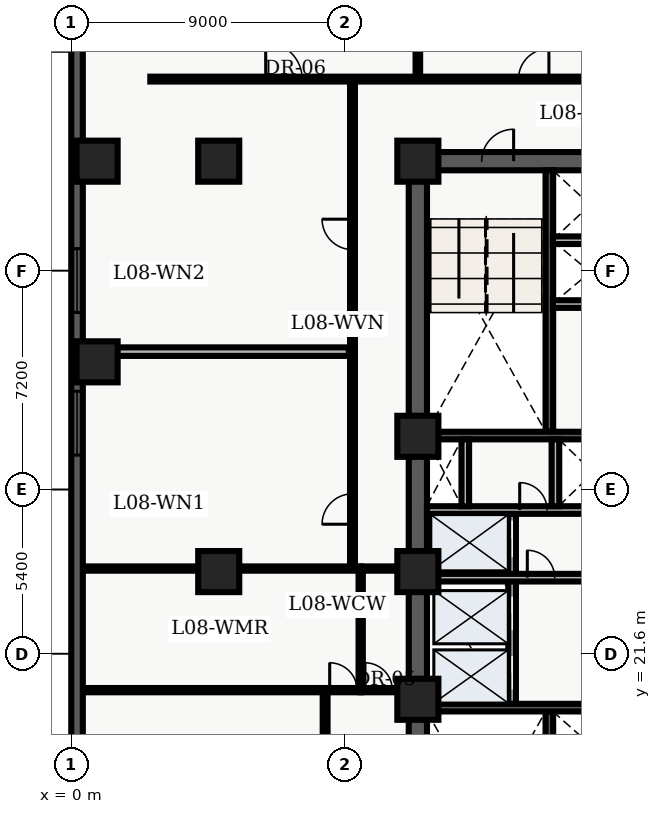
"""IFC4 building model, lengths in metres.
Left out: names, types, materials, properties, quantities, classifications, styles, units other than length and angle.
Written with IfcOpenShell. Run it as: python <this file> out.ifc"""

import sys

from ifc_helpers import new_model, entity, si_unit, converted_unit, direction, frame, origin_with_axes, origin_2d_with_axis, place, context, subcontext, project, spatial, polyline, rectangle, outline, extrude, element, fill, save


model = new_model("IFC4")
c1 = context("Model", 3, precision=1e-05, world=origin_with_axes(), true_north=direction((0.0, 1.0)))
c2 = subcontext(c1, "Body", "Model", "MODEL_VIEW")
j1 = project(units=[si_unit("LENGTHUNIT", "METRE"), converted_unit("PLANEANGLEUNIT", "DEGREE", entity("IfcPlaneAngleMeasure", 0.017), si_unit("PLANEANGLEUNIT", "RADIAN"), dimensions=[0, 0, 0, 0, 0, 0, 0])], contexts=[c1])
p1 = place(None, origin_with_axes())
s1 = spatial("IfcSite", under=j1, at=p1, CompositionType="ELEMENT")
p2 = place(p1, origin_with_axes())
s2 = spatial("IfcBuilding", under=s1, at=p2, CompositionType="ELEMENT")
p3 = place(p2, frame((0.0, 0.0, 36.6), z_axis=(0.0, 0.0, 1.0), x_axis=(1.0, 0.0, 0.0)))
s3 = spatial("IfcBuildingStorey", under=s2, at=p3, CompositionType="ELEMENT", Elevation=36.6)
p4 = place(p3, frame((11.4, 10.8, 0.0), z_axis=(0.0, 0.0, 1.0), x_axis=(0.0, 1.0, 0.0)))
e1 = element("IfcWall", 1, at=p4, inside=s3, PredefinedType="SHEAR", context=c2, shape_type="SweptSolid", body=[
    extrude(outline(polyline([(0.0, -0.3), (27.0, -0.3), (27.0, 0.3), (0.0, 0.3), (0.0, -0.3)])), origin_with_axes(), (0.0, 0.0, 1.0), 3.66),
])
p5 = place(p3, frame((11.4, 37.8, 0.0), z_axis=(0.0, 0.0, 1.0), x_axis=(1.0, 0.0, 0.0)))
e2 = element("IfcWall", 2, at=p5, inside=s3, PredefinedType="SHEAR", context=c2, shape_type="SweptSolid", body=[
    extrude(outline(polyline([(0.0, -0.3), (7.2, -0.3), (7.2, 0.3), (0.0, 0.3), (0.0, -0.3)])), origin_with_axes(), (0.0, 0.0, 1.0), 3.66),
])
p6 = place(p5, frame((2.625, 0.0, 0.0), z_axis=(0.0, 0.0, 1.0), x_axis=(1.0, 0.0, 0.0)))
e3 = element("IfcOpeningElement", 3, at=p6, cuts=e2, PredefinedType="OPENING", context=c2, shape_type="SweptSolid", body=[
    extrude(rectangle(XDim=1.05, YDim=0.62, at=origin_2d_with_axis()), origin_with_axes(), (0.0, 0.0, 1.0), 2.15),
])
p7 = place(p3, frame((15.725, 11.1, 0.0), z_axis=(0.0, 0.0, 1.0), x_axis=(0.0, 1.0, 0.0)))
e4 = element("IfcWall", 4, at=p7, inside=s3, PredefinedType="SHEAR", context=c2, shape_type="SweptSolid", body=[
    extrude(outline(polyline([(0.0, -0.125), (8.6, -0.125), (8.6, 0.125), (0.0, 0.125), (0.0, -0.125)])), origin_with_axes(), (0.0, 0.0, 1.0), 3.66),
])
p8 = place(p3, frame((11.7, 19.825, 0.0), z_axis=(0.0, 0.0, 1.0), x_axis=(1.0, 0.0, 0.0)))
e5 = element("IfcWall", 5, at=p8, inside=s3, PredefinedType="SHEAR", context=c2, shape_type="SweptSolid", body=[
    extrude(outline(polyline([(0.0, -0.125), (6.6, -0.125), (6.6, 0.125), (0.0, 0.125), (0.0, -0.125)])), origin_with_axes(), (0.0, 0.0, 1.0), 3.66),
])
p9 = place(p3, frame((15.725, 28.9, 0.0), z_axis=(0.0, 0.0, 1.0), x_axis=(0.0, 1.0, 0.0)))
e6 = element("IfcWall", 6, at=p9, inside=s3, PredefinedType="SHEAR", context=c2, shape_type="SweptSolid", body=[
    extrude(outline(polyline([(0.0, -0.125), (8.6, -0.125), (8.6, 0.125), (0.0, 0.125), (0.0, -0.125)])), origin_with_axes(), (0.0, 0.0, 1.0), 3.66),
])
p10 = place(p3, frame((11.7, 28.775, 0.0), z_axis=(0.0, 0.0, 1.0), x_axis=(1.0, 0.0, 0.0)))
e7 = element("IfcWall", 7, at=p10, inside=s3, PredefinedType="SHEAR", context=c2, shape_type="SweptSolid", body=[
    extrude(outline(polyline([(0.0, -0.125), (6.6, -0.125), (6.6, 0.125), (0.0, 0.125), (0.0, -0.125)])), origin_with_axes(), (0.0, 0.0, 1.0), 3.66),
])
p11 = place(p3, frame((14.5, 19.95, 0.0), z_axis=(0.0, 0.0, 1.0), x_axis=(0.0, 1.0, 0.0)))
e8 = element("IfcWall", 8, at=p11, inside=s3, PredefinedType="SOLIDWALL", context=c2, shape_type="SweptSolid", body=[
    extrude(outline(polyline([(0.0, -0.125), (6.25, -0.125), (6.25, 0.125), (0.0, 0.125), (0.0, -0.125)])), origin_with_axes(), (0.0, 0.0, 1.0), 2.7),
])
p12 = place(p11, frame((1.025, 0.0, 0.0), z_axis=(0.0, 0.0, 1.0), x_axis=(1.0, 0.0, 0.0)))
e9 = element("IfcOpeningElement", 9, at=p12, cuts=e8, PredefinedType="OPENING", context=c2, shape_type="SweptSolid", body=[
    extrude(rectangle(XDim=1.1, YDim=0.27, at=origin_2d_with_axis()), origin_with_axes(), (0.0, 0.0, 1.0), 2.15),
])
p13 = place(p11, frame((2.975, 0.0, 0.0), z_axis=(0.0, 0.0, 1.0), x_axis=(1.0, 0.0, 0.0)))
e10 = element("IfcOpeningElement", 10, at=p13, cuts=e8, PredefinedType="OPENING", context=c2, shape_type="SweptSolid", body=[
    extrude(rectangle(XDim=1.1, YDim=0.27, at=origin_2d_with_axis()), origin_with_axes(), (0.0, 0.0, 1.0), 2.15),
])
p14 = place(p11, frame((5.425, 0.0, 0.0), z_axis=(0.0, 0.0, 1.0), x_axis=(1.0, 0.0, 0.0)))
e11 = element("IfcOpeningElement", 11, at=p14, cuts=e8, PredefinedType="OPENING", context=c2, shape_type="SweptSolid", body=[
    extrude(rectangle(XDim=1.2, YDim=0.27, at=origin_2d_with_axis()), origin_with_axes(), (0.0, 0.0, 1.0), 2.15),
])
p15 = place(p3, frame((11.7, 24.1, 0.0), z_axis=(0.0, 0.0, 1.0), x_axis=(1.0, 0.0, 0.0)))
e12 = element("IfcWall", 12, at=p15, inside=s3, PredefinedType="SOLIDWALL", context=c2, shape_type="SweptSolid", body=[
    extrude(outline(polyline([(0.0, -0.125), (6.6, -0.125), (6.6, 0.125), (0.0, 0.125), (0.0, -0.125)])), origin_with_axes(), (0.0, 0.0, 1.0), 2.7),
])
p16 = place(p15, frame((3.75, 0.0, 0.0), z_axis=(0.0, 0.0, 1.0), x_axis=(1.0, 0.0, 0.0)))
e13 = element("IfcOpeningElement", 13, at=p16, cuts=e12, PredefinedType="OPENING", context=c2, shape_type="SweptSolid", body=[
    extrude(rectangle(XDim=0.9, YDim=0.27, at=origin_2d_with_axis()), origin_with_axes(), (0.0, 0.0, 1.0), 2.15),
])
p17 = place(p3, frame((11.7, 26.325, 0.0), z_axis=(0.0, 0.0, 1.0), x_axis=(1.0, 0.0, 0.0)))
e14 = element("IfcWall", 14, at=p17, inside=s3, PredefinedType="SOLIDWALL", context=c2, shape_type="SweptSolid", body=[
    extrude(outline(polyline([(0.0, -0.125), (6.6, -0.125), (6.6, 0.125), (0.0, 0.125), (0.0, -0.125)])), origin_with_axes(), (0.0, 0.0, 1.0), 2.7),
])
p18 = place(p17, frame((3.5, 0.0, 0.0), z_axis=(0.0, 0.0, 1.0), x_axis=(1.0, 0.0, 0.0)))
e15 = element("IfcOpeningElement", 15, at=p18, cuts=e14, PredefinedType="OPENING", context=c2, shape_type="SweptSolid", body=[
    extrude(rectangle(XDim=0.9, YDim=0.27, at=origin_2d_with_axis()), origin_with_axes(), (0.0, 0.0, 1.0), 2.15),
])
for number, where, z_axis, x_axis in (
    (16, (12.96, 26.45, 0.0), (0.0, 0.0, 1.0), (0.0, 1.0, 0.0)),
    (17, (15.925, 26.45, 0.0), (0.0, 0.0, 1.0), (0.0, 1.0, 0.0)),
):
    element("IfcWall", number, at=place(p3, frame(where, z_axis=z_axis, x_axis=x_axis)), inside=s3, PredefinedType="SOLIDWALL", context=c2, shape_type="SweptSolid", body=[
        extrude(outline(polyline([(0.0, -0.125), (2.2, -0.125), (2.2, 0.125), (0.0, 0.125), (0.0, -0.125)])), origin_with_axes(), (0.0, 0.0, 1.0), 2.7),
    ])
for number, where, z_axis, x_axis in (
    (18, (11.4, 20.1, 0.0), (0.0, 0.0, 1.0), (1.0, 0.0, 0.0)),
    (19, (11.4, 24.3, 0.0), (0.0, 0.0, 1.0), (1.0, 0.0, 0.0)),
    (20, (11.4, 28.75, 0.0), (0.0, 0.0, 1.0), (1.0, 0.0, 0.0)),
    (21, (11.4, 37.8, 0.0), (0.0, 0.0, 1.0), (1.0, 0.0, 0.0)),
    (22, (4.85, 24.3, 0.0), (0.0, 0.0, 1.0), (1.0, 0.0, 0.0)),
    (23, (4.85, 37.8, 0.0), (0.0, 0.0, 1.0), (1.0, 0.0, 0.0)),
    (24, (0.85, 31.2, 0.0), (0.0, 0.0, 1.0), (1.0, 0.0, 0.0)),
    (25, (0.85, 37.8, 0.0), (0.0, 0.0, 1.0), (1.0, 0.0, 0.0)),
):
    element("IfcColumn", number, at=place(p3, frame(where, z_axis=z_axis, x_axis=x_axis)), inside=s3, PredefinedType="COLUMN", context=c2, shape_type="SweptSolid", body=[
        extrude(rectangle(XDim=1.35, YDim=1.35, at=origin_2d_with_axis()), origin_with_axes(), (0.0, 0.0, 1.0), 3.9),
    ])
for number, where, z_axis, x_axis in (
    (26, (15.84, 33.1, 0.0), (0.0, 0.0, 1.0), (1.0, 0.0, 0.0)),
    (27, (15.84, 35.2, 0.0), (0.0, 0.0, 1.0), (1.0, 0.0, 0.0)),
):
    element("IfcWall", number, at=place(p3, frame(where, z_axis=z_axis, x_axis=x_axis)), inside=s3, PredefinedType="SOLIDWALL", context=c2, shape_type="SweptSolid", body=[
        extrude(outline(polyline([(0.0, -0.125), (2.46, -0.125), (2.46, 0.125), (0.0, 0.125), (0.0, -0.125)])), origin_with_axes(), (0.0, 0.0, 1.0), 2.7),
    ])
p19 = place(p3, frame((9.52, 20.4, 0.0), z_axis=(0.0, 0.0, 1.0), x_axis=(0.0, 1.0, 0.0)))
e28 = element("IfcWall", 28, at=p19, inside=s3, PredefinedType="PARTITIONING", context=c2, shape_type="SweptSolid", body=[
    extrude(outline(polyline([(0.0, -0.07), (4.0, -0.07), (4.0, 0.07), (0.0, 0.07), (0.0, -0.07)])), origin_with_axes(), (0.0, 0.0, 1.0), 2.7),
])
p20 = place(p3, frame((9.52, 20.4, 0.0), z_axis=(0.0, 0.0, 1.0), x_axis=(1.0, 0.0, 0.0)))
e29 = element("IfcWall", 29, at=p20, inside=s3, PredefinedType="PARTITIONING", context=c2, shape_type="SweptSolid", body=[
    extrude(outline(polyline([(0.0, -0.07), (1.58, -0.07), (1.58, 0.07), (0.0, 0.07), (0.0, -0.07)])), origin_with_axes(), (0.0, 0.0, 1.0), 2.7),
])
p21 = place(p20, frame((0.59, 0.0, 0.0), z_axis=(0.0, 0.0, 1.0), x_axis=(1.0, 0.0, 0.0)))
e30 = element("IfcOpeningElement", 30, at=p21, cuts=e29, PredefinedType="OPENING", context=c2, shape_type="SweptSolid", body=[
    extrude(rectangle(XDim=0.9, YDim=0.16, at=origin_2d_with_axis()), origin_with_axes(), (0.0, 0.0, 1.0), 2.15),
])
p22 = place(p3, frame((9.52, 24.4, 0.0), z_axis=(0.0, 0.0, 1.0), x_axis=(1.0, 0.0, 0.0)))
e31 = element("IfcWall", 31, at=p22, inside=s3, PredefinedType="PARTITIONING", context=c2, shape_type="SweptSolid", body=[
    extrude(outline(polyline([(0.0, -0.07), (1.58, -0.07), (1.58, 0.07), (0.0, 0.07), (0.0, -0.07)])), origin_with_axes(), (0.0, 0.0, 1.0), 2.7),
])
p23 = place(p3, frame((2.6, 40.5, 0.0), z_axis=(0.0, 0.0, 1.0), x_axis=(1.0, 0.0, 0.0)))
e32 = element("IfcWall", 32, at=p23, inside=s3, PredefinedType="PARTITIONING", context=c2, shape_type="SweptSolid", body=[
    extrude(outline(polyline([(0.0, -0.08), (18.65, -0.08), (18.65, 0.08), (0.0, 0.08), (0.0, -0.08)])), origin_with_axes(), (0.0, 0.0, 1.0), 2.7),
])
p24 = place(p23, frame((4.395, 0.0, 0.0), z_axis=(0.0, 0.0, 1.0), x_axis=(1.0, 0.0, 0.0)))
e33 = element("IfcOpeningElement", 33, at=p24, cuts=e32, PredefinedType="OPENING", context=c2, shape_type="SweptSolid", body=[
    extrude(rectangle(XDim=1.2, YDim=0.18, at=origin_2d_with_axis()), origin_with_axes(), (0.0, 0.0, 1.0), 2.2),
])
p25 = place(p23, frame((12.61, 0.0, 0.0), z_axis=(0.0, 0.0, 1.0), x_axis=(1.0, 0.0, 0.0)))
e34 = element("IfcOpeningElement", 34, at=p25, cuts=e32, PredefinedType="OPENING", context=c2, shape_type="SweptSolid", body=[
    extrude(rectangle(XDim=1.0, YDim=0.18, at=origin_2d_with_axis()), origin_with_axes(), (0.0, 0.0, 1.0), 2.15),
])
p26 = place(p3, frame((8.35, 7.8, 0.0), z_axis=(0.0, 0.0, 1.0), x_axis=(0.0, 1.0, 0.0)))
e35 = element("IfcWall", 35, at=p26, inside=s3, PredefinedType="PARTITIONING", context=c2, shape_type="SweptSolid", body=[
    extrude(outline(polyline([(0.0, -0.08), (12.6, -0.08), (12.6, 0.08), (0.0, 0.08), (0.0, -0.08)])), origin_with_axes(), (0.0, 0.0, 1.0), 2.7),
])
p27 = place(p26, frame((6.325, 0.0, 0.0), z_axis=(0.0, 0.0, 1.0), x_axis=(1.0, 0.0, 0.0)))
e36 = element("IfcOpeningElement", 36, at=p27, cuts=e35, PredefinedType="OPENING", context=c2, shape_type="SweptSolid", body=[
    extrude(rectangle(XDim=1.0, YDim=0.18, at=origin_2d_with_axis()), origin_with_axes(), (0.0, 0.0, 1.0), 2.15),
])
p28 = place(p3, frame((9.25, 24.4, 0.0), z_axis=(0.0, 0.0, 1.0), x_axis=(0.0, 1.0, 0.0)))
e37 = element("IfcWall", 37, at=p28, inside=s3, PredefinedType="PARTITIONING", context=c2, shape_type="SweptSolid", body=[
    extrude(outline(polyline([(0.0, -0.08), (16.1, -0.08), (16.1, 0.08), (0.0, 0.08), (0.0, -0.08)])), origin_with_axes(), (0.0, 0.0, 1.0), 2.7),
])
p29 = place(p28, frame((1.958, 0.0, 0.0), z_axis=(0.0, 0.0, 1.0), x_axis=(1.0, 0.0, 0.0)))
e38 = element("IfcOpeningElement", 38, at=p29, cuts=e37, PredefinedType="OPENING", context=c2, shape_type="SweptSolid", body=[
    extrude(rectangle(XDim=1.0, YDim=0.18, at=origin_2d_with_axis()), origin_with_axes(), (0.0, 0.0, 1.0), 2.15),
])
p30 = place(p28, frame((10.992, 0.0, 0.0), z_axis=(0.0, 0.0, 1.0), x_axis=(1.0, 0.0, 0.0)))
e39 = element("IfcOpeningElement", 39, at=p30, cuts=e37, PredefinedType="OPENING", context=c2, shape_type="SweptSolid", body=[
    extrude(rectangle(XDim=1.0, YDim=0.18, at=origin_2d_with_axis()), origin_with_axes(), (0.0, 0.0, 1.0), 2.15),
])
p31 = place(p3, frame((0.36, 20.4, 0.0), z_axis=(0.0, 0.0, 1.0), x_axis=(1.0, 0.0, 0.0)))
e40 = element("IfcWall", 40, at=p31, inside=s3, PredefinedType="PARTITIONING", context=c2, shape_type="SweptSolid", body=[
    extrude(outline(polyline([(0.0, -0.07), (9.16, -0.07), (9.16, 0.07), (0.0, 0.07), (0.0, -0.07)])), origin_with_axes(), (0.0, 0.0, 1.0), 2.7),
])
p32 = place(p31, frame((8.59, 0.0, 0.0), z_axis=(0.0, 0.0, 1.0), x_axis=(1.0, 0.0, 0.0)))
e41 = element("IfcOpeningElement", 41, at=p32, cuts=e40, PredefinedType="OPENING", context=c2, shape_type="SweptSolid", body=[
    extrude(rectangle(XDim=0.9, YDim=0.16, at=origin_2d_with_axis()), origin_with_axes(), (0.0, 0.0, 1.0), 2.15),
])
p33 = place(p3, frame((0.36, 24.4, 0.0), z_axis=(0.0, 0.0, 1.0), x_axis=(1.0, 0.0, 0.0)))
e42 = element("IfcWall", 42, at=p33, inside=s3, PredefinedType="PARTITIONING", context=c2, shape_type="SweptSolid", body=[
    extrude(outline(polyline([(0.0, -0.07), (9.16, -0.07), (9.16, 0.07), (0.0, 0.07), (0.0, -0.07)])), origin_with_axes(), (0.0, 0.0, 1.0), 2.7),
])
p34 = place(p3, frame((0.375, 31.535, 0.0), z_axis=(0.0, 0.0, 1.0), x_axis=(1.0, 0.0, 0.0)))
e43 = element("IfcWall", 43, at=p34, inside=s3, PredefinedType="PARTITIONING", context=c2, shape_type="SweptSolid", body=[
    extrude(outline(polyline([(0.0, -0.14), (8.755, -0.14), (8.755, 0.14), (0.0, 0.14), (0.0, -0.14)])), origin_with_axes(), (0.0, 0.0, 1.0), 2.7),
])
p35 = place(p3, frame((11.4, 40.6, 0.0), z_axis=(0.0, 0.0, 1.0), x_axis=(0.0, 1.0, 0.0)))
e44 = element("IfcWall", 44, at=p35, inside=s3, PredefinedType="PARTITIONING", context=c2, shape_type="SweptSolid", body=[
    extrude(outline(polyline([(0.0, -0.075), (7.64, -0.075), (7.64, 0.075), (0.0, 0.075), (0.0, -0.075)])), origin_with_axes(), (0.0, 0.0, 1.0), 2.7),
])
p36 = place(p3, frame((0.19, 2.78, 0.0), z_axis=(0.0, 0.0, 1.0), x_axis=(0.0, 1.0, 0.0)))
e45 = element("IfcWall", 45, at=p36, inside=s3, PredefinedType="SOLIDWALL", context=c2, shape_type="SweptSolid", body=[
    extrude(outline(polyline([(0.0, -0.19), (43.42, -0.19), (43.42, 0.19), (0.0, 0.19), (0.0, -0.19)])), origin_with_axes(), (0.0, 0.0, 1.0), 3.66),
])
p37 = place(p36, frame((2.946, 0.0, 0.45), z_axis=(0.0, 0.0, 1.0), x_axis=(1.0, 0.0, 0.0)))
e46 = element("IfcOpeningElement", 46, at=p37, cuts=e45, PredefinedType="OPENING", context=c2, shape_type="SweptSolid", body=[
    extrude(rectangle(XDim=2.1, YDim=0.4, at=origin_2d_with_axis()), origin_with_axes(), (0.0, 0.0, 1.0), 2.2),
])
p38 = place(p36, frame((12.328, 0.0, 0.45), z_axis=(0.0, 0.0, 1.0), x_axis=(1.0, 0.0, 0.0)))
e47 = element("IfcOpeningElement", 47, at=p38, cuts=e45, PredefinedType="OPENING", context=c2, shape_type="SweptSolid", body=[
    extrude(rectangle(XDim=2.1, YDim=0.4, at=origin_2d_with_axis()), origin_with_axes(), (0.0, 0.0, 1.0), 2.2),
])
p39 = place(p36, frame((26.401, 0.0, 0.45), z_axis=(0.0, 0.0, 1.0), x_axis=(1.0, 0.0, 0.0)))
e48 = element("IfcOpeningElement", 48, at=p39, cuts=e45, PredefinedType="OPENING", context=c2, shape_type="SweptSolid", body=[
    extrude(rectangle(XDim=2.1, YDim=0.4, at=origin_2d_with_axis()), origin_with_axes(), (0.0, 0.0, 1.0), 2.2),
])
p40 = place(p36, frame((31.092, 0.0, 0.45), z_axis=(0.0, 0.0, 1.0), x_axis=(1.0, 0.0, 0.0)))
e49 = element("IfcOpeningElement", 49, at=p40, cuts=e45, PredefinedType="OPENING", context=c2, shape_type="SweptSolid", body=[
    extrude(rectangle(XDim=2.1, YDim=0.4, at=origin_2d_with_axis()), origin_with_axes(), (0.0, 0.0, 1.0), 2.2),
])
p41 = place(p36, frame((40.024, 0.0, 0.45), z_axis=(0.0, 0.0, 1.0), x_axis=(1.0, 0.0, 0.0)))
e50 = element("IfcOpeningElement", 50, at=p41, cuts=e45, PredefinedType="OPENING", context=c2, shape_type="SweptSolid", body=[
    extrude(rectangle(XDim=2.1, YDim=0.4, at=origin_2d_with_axis()), origin_with_axes(), (0.0, 0.0, 1.0), 2.2),
])
p42 = place(p11, frame((1.025, 0.0, 0.0), z_axis=(0.0, 0.0, 1.0), x_axis=(1.0, 0.0, 0.0)))
e51 = element("IfcDoor", 51, at=p42, inside=s3, OperationType="SLIDING_TO_LEFT", PredefinedType="DOOR", context=c2, shape_type="SweptSolid", body=[
    extrude(rectangle(XDim=1.1, YDim=0.09, at=origin_2d_with_axis()), origin_with_axes(), (0.0, 0.0, 1.0), 2.15),
])
fill(e9, e51)
p43 = place(p11, frame((2.975, 0.0, 0.0), z_axis=(0.0, 0.0, 1.0), x_axis=(1.0, 0.0, 0.0)))
e52 = element("IfcDoor", 52, at=p43, inside=s3, OperationType="SLIDING_TO_RIGHT", PredefinedType="DOOR", context=c2, shape_type="SweptSolid", body=[
    extrude(rectangle(XDim=1.1, YDim=0.09, at=origin_2d_with_axis()), origin_with_axes(), (0.0, 0.0, 1.0), 2.15),
])
fill(e10, e52)
p44 = place(p11, frame((5.425, 0.0, 0.0), z_axis=(0.0, 0.0, 1.0), x_axis=(1.0, 0.0, 0.0)))
e53 = element("IfcDoor", 53, at=p44, inside=s3, OperationType="DOUBLE_DOOR_SLIDING", PredefinedType="DOOR", context=c2, shape_type="SweptSolid", body=[
    extrude(rectangle(XDim=1.2, YDim=0.09, at=origin_2d_with_axis()), origin_with_axes(), (0.0, 0.0, 1.0), 2.15),
])
fill(e11, e53)
p45 = place(p5, frame((2.625, 0.0, 0.0), z_axis=(0.0, 0.0, 1.0), x_axis=(1.0, 0.0, 0.0)))
e54 = element("IfcDoor", 54, at=p45, inside=s3, OperationType="SINGLE_SWING_RIGHT", PredefinedType="DOOR", context=c2, shape_type="SweptSolid", body=[
    extrude(rectangle(XDim=1.05, YDim=0.09, at=origin_2d_with_axis()), origin_with_axes(), (0.0, 0.0, 1.0), 2.15),
])
fill(e3, e54)
p46 = place(p15, frame((3.75, 0.0, 0.0), z_axis=(0.0, 0.0, 1.0), x_axis=(1.0, 0.0, 0.0)))
e55 = element("IfcDoor", 55, at=p46, inside=s3, OperationType="SINGLE_SWING_LEFT", PredefinedType="DOOR", context=c2, shape_type="SweptSolid", body=[
    extrude(rectangle(XDim=0.9, YDim=0.09, at=origin_2d_with_axis()), origin_with_axes(), (0.0, 0.0, 1.0), 2.15),
])
fill(e13, e55)
p47 = place(p17, frame((3.5, 0.0, 0.0), z_axis=(0.0, 0.0, 1.0), x_axis=(1.0, 0.0, 0.0)))
e56 = element("IfcDoor", 56, at=p47, inside=s3, OperationType="SINGLE_SWING_LEFT", PredefinedType="DOOR", context=c2, shape_type="SweptSolid", body=[
    extrude(rectangle(XDim=0.9, YDim=0.09, at=origin_2d_with_axis()), origin_with_axes(), (0.0, 0.0, 1.0), 2.15),
])
fill(e15, e56)
p48 = place(p20, frame((0.59, 0.0, 0.0), z_axis=(0.0, 0.0, 1.0), x_axis=(1.0, 0.0, 0.0)))
e57 = element("IfcDoor", 57, at=p48, inside=s3, OperationType="SINGLE_SWING_LEFT", PredefinedType="DOOR", context=c2, shape_type="SweptSolid", body=[
    extrude(rectangle(XDim=0.9, YDim=0.084, at=origin_2d_with_axis()), origin_with_axes(), (0.0, 0.0, 1.0), 2.15),
])
fill(e30, e57)
p49 = place(p31, frame((8.59, 0.0, 0.0), z_axis=(0.0, 0.0, 1.0), x_axis=(1.0, 0.0, 0.0)))
e58 = element("IfcDoor", 58, at=p49, inside=s3, OperationType="SINGLE_SWING_LEFT", PredefinedType="DOOR", context=c2, shape_type="SweptSolid", body=[
    extrude(rectangle(XDim=0.9, YDim=0.084, at=origin_2d_with_axis()), origin_with_axes(), (0.0, 0.0, 1.0), 2.15),
])
fill(e41, e58)
p50 = place(p28, frame((1.958, 0.0, 0.0), z_axis=(0.0, 0.0, 1.0), x_axis=(1.0, 0.0, 0.0)))
e59 = element("IfcDoor", 59, at=p50, inside=s3, OperationType="SINGLE_SWING_LEFT", PredefinedType="DOOR", context=c2, shape_type="SweptSolid", body=[
    extrude(rectangle(XDim=1.0, YDim=0.09, at=origin_2d_with_axis()), origin_with_axes(), (0.0, 0.0, 1.0), 2.15),
])
fill(e38, e59)
p51 = place(p28, frame((10.992, 0.0, 0.0), z_axis=(0.0, 0.0, 1.0), x_axis=(1.0, 0.0, 0.0)))
e60 = element("IfcDoor", 60, at=p51, inside=s3, OperationType="SINGLE_SWING_RIGHT", PredefinedType="DOOR", context=c2, shape_type="SweptSolid", body=[
    extrude(rectangle(XDim=1.0, YDim=0.09, at=origin_2d_with_axis()), origin_with_axes(), (0.0, 0.0, 1.0), 2.15),
])
fill(e39, e60)
p52 = place(p23, frame((4.395, 0.0, 0.0), z_axis=(0.0, 0.0, 1.0), x_axis=(1.0, 0.0, 0.0)))
e61 = element("IfcDoor", 61, at=p52, inside=s3, OperationType="SINGLE_SWING_LEFT", PredefinedType="DOOR", context=c2, shape_type="SweptSolid", body=[
    extrude(rectangle(XDim=1.2, YDim=0.09, at=origin_2d_with_axis()), origin_with_axes(), (0.0, 0.0, 1.0), 2.2),
])
fill(e33, e61)
p53 = place(p23, frame((12.61, 0.0, 0.0), z_axis=(0.0, 0.0, 1.0), x_axis=(1.0, 0.0, 0.0)))
e62 = element("IfcDoor", 62, at=p53, inside=s3, OperationType="SINGLE_SWING_RIGHT", PredefinedType="DOOR", context=c2, shape_type="SweptSolid", body=[
    extrude(rectangle(XDim=1.0, YDim=0.09, at=origin_2d_with_axis()), origin_with_axes(), (0.0, 0.0, 1.0), 2.15),
])
fill(e34, e62)
p54 = place(p36, frame((26.401, 0.0, 0.45), z_axis=(0.0, 0.0, 1.0), x_axis=(1.0, 0.0, 0.0)))
e63 = element("IfcWindow", 63, at=p54, inside=s3, PredefinedType="WINDOW", context=c2, shape_type="SweptSolid", body=[
    extrude(rectangle(XDim=2.1, YDim=0.09, at=origin_2d_with_axis()), origin_with_axes(), (0.0, 0.0, 1.0), 2.2),
])
fill(e48, e63)
p55 = place(p36, frame((31.092, 0.0, 0.45), z_axis=(0.0, 0.0, 1.0), x_axis=(1.0, 0.0, 0.0)))
e64 = element("IfcWindow", 64, at=p55, inside=s3, PredefinedType="WINDOW", context=c2, shape_type="SweptSolid", body=[
    extrude(rectangle(XDim=2.1, YDim=0.09, at=origin_2d_with_axis()), origin_with_axes(), (0.0, 0.0, 1.0), 2.2),
])
fill(e49, e64)
save(model, sys.argv[1])
